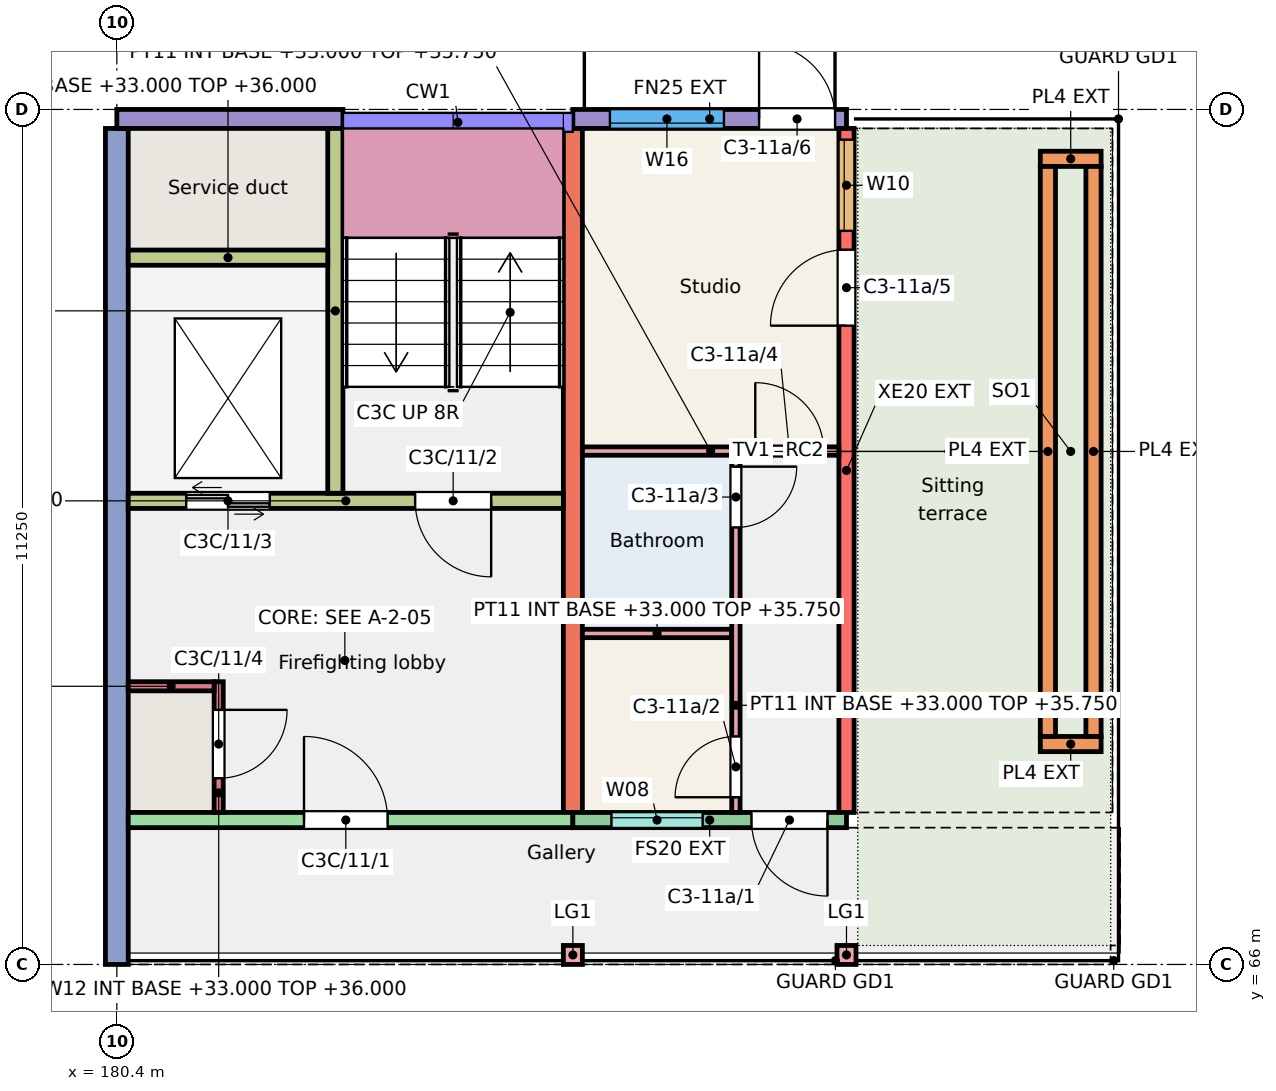
"""IFC4 building model, lengths in metres.
Left out: names, types, materials, properties, quantities, classifications, styles, units other than length and angle.
Written with IfcOpenShell. Run it as: python <this file> out.ifc"""

import sys

from ifc_helpers import new_model, si_unit, direction, frame, frame_2d, origin, origin_2d, place, context, subcontext, project, spatial, rectangle, extrude, element, fill, save


model = new_model("IFC4")
c1 = context("Model", 3, precision=1e-05, world=origin(), true_north=direction((0.0, 1.0)))
c2 = subcontext(c1, "Body", "Model", "MODEL_VIEW")
j1 = project(units=[si_unit("LENGTHUNIT", "METRE"), si_unit("PLANEANGLEUNIT", "RADIAN")], contexts=[c1])
p1 = place(None, origin())
s1 = spatial("IfcSite", under=j1, at=p1, CompositionType="ELEMENT")
p2 = place(p1, origin())
s2 = spatial("IfcBuilding", under=s1, at=p2, CompositionType="ELEMENT")
p3 = place(p2, frame((0.0, 0.0, 33.0)))
s3 = spatial("IfcBuildingStorey", under=s2, at=p3, CompositionType="ELEMENT", Elevation=33.0)
p4 = place(p3, frame((180.4, 66.0, 0.0), z_axis=(0.0, 0.0, 1.0), x_axis=(0.0, 1.0, 0.0)))
e1 = element("IfcWall", 1, at=p4, inside=s3, PredefinedType="SHEAR", context=c2, shape_type="SweptSolid", body=[
    extrude(rectangle(XDim=11.0, YDim=0.3, at=frame_2d((5.5, 0.0))), origin(), (0.0, 0.0, 1.0), 3.0),
])
p5 = place(p3, frame((186.4, 68.0, 0.0), z_axis=(0.0, 0.0, 1.0), x_axis=(0.0, 1.0, 0.0)))
e2 = element("IfcWall", 2, at=p5, inside=s3, PredefinedType="SHEAR", context=c2, shape_type="SweptSolid", body=[
    extrude(rectangle(XDim=9.0, YDim=0.25, at=frame_2d((4.5, 0.0))), origin(), (0.0, 0.0, 1.0), 3.0),
])
p6 = place(p3, frame((190.0, 68.0, 0.0), z_axis=(0.0, 0.0, 1.0), x_axis=(0.0, 1.0, 0.0)))
e3 = element("IfcWall", 3, at=p6, inside=s3, PredefinedType="SHEAR", context=c2, shape_type="SweptSolid", body=[
    extrude(rectangle(XDim=9.0, YDim=0.2, at=frame_2d((4.5, 0.0))), origin(), (0.0, 0.0, 1.0), 3.0),
])
p7 = place(p6, frame((7.653, 0.0, 0.9)))
e4 = element("IfcOpeningElement", 4, at=p7, cuts=e3, PredefinedType="OPENING", context=c2, shape_type="SweptSolid", body=[
    extrude(rectangle(XDim=1.2, YDim=1.5, at=frame_2d((0.6, 0.75))), frame((0.0, 0.11, 0.0), z_axis=(0.0, -1.0, 0.0), x_axis=(1.0, 0.0, 0.0)), (0.0, 0.0, 1.0), 0.22),
])
p8 = place(p6, frame((6.405, 0.0, 0.0)))
e5 = element("IfcOpeningElement", 5, at=p8, cuts=e3, PredefinedType="OPENING", context=c2, shape_type="SweptSolid", body=[
    extrude(rectangle(XDim=1.0, YDim=2.1, at=frame_2d((0.5, 1.05))), frame((0.0, 0.11, 0.0), z_axis=(0.0, -1.0, 0.0), x_axis=(1.0, 0.0, 0.0)), (0.0, 0.0, 1.0), 0.22),
])
p9 = place(p3, frame((180.4, 77.125, 0.0), z_axis=(0.0, 0.0, 1.0), x_axis=(1.0, 0.0, 0.0)))
e6 = element("IfcWall", 6, at=p9, inside=s3, PredefinedType="SOLIDWALL", context=c2, shape_type="SweptSolid", body=[
    extrude(rectangle(XDim=2.975, YDim=0.25, at=frame_2d((1.488, 0.0))), origin(), (0.0, 0.0, 1.0), 3.0),
])
p10 = place(p3, frame((180.55, 67.9, 0.0), z_axis=(0.0, 0.0, 1.0), x_axis=(1.0, 0.0, 0.0)))
e7 = element("IfcWall", 7, at=p10, inside=s3, PredefinedType="SHEAR", context=c2, shape_type="SweptSolid", body=[
    extrude(rectangle(XDim=5.85, YDim=0.2, at=frame_2d((2.925, 0.0))), origin(), (0.0, 0.0, 1.0), 3.0),
])
p11 = place(p10, frame((2.312, 0.0, 0.0)))
e8 = element("IfcOpeningElement", 8, at=p11, cuts=e7, PredefinedType="OPENING", context=c2, shape_type="SweptSolid", body=[
    extrude(rectangle(XDim=1.1, YDim=2.1, at=frame_2d((0.55, 1.05))), frame((0.0, 0.11, 0.0), z_axis=(0.0, -1.0, 0.0), x_axis=(1.0, 0.0, 0.0)), (0.0, 0.0, 1.0), 0.22),
])
p12 = place(p3, frame((180.55, 72.1, 0.0), z_axis=(0.0, 0.0, 1.0), x_axis=(1.0, 0.0, 0.0)))
e9 = element("IfcWall", 9, at=p12, inside=s3, PredefinedType="SHEAR", context=c2, shape_type="SweptSolid", body=[
    extrude(rectangle(XDim=5.725, YDim=0.2, at=frame_2d((2.862, 0.0))), origin(), (0.0, 0.0, 1.0), 3.0),
])
p13 = place(p12, frame((3.775, 0.0, 0.0)))
e10 = element("IfcOpeningElement", 10, at=p13, cuts=e9, PredefinedType="OPENING", context=c2, shape_type="SweptSolid", body=[
    extrude(rectangle(XDim=1.0, YDim=2.1, at=frame_2d((0.5, 1.05))), frame((0.0, 0.11, 0.0), z_axis=(0.0, -1.0, 0.0), x_axis=(1.0, 0.0, 0.0)), (0.0, 0.0, 1.0), 0.22),
])
p14 = place(p12, frame((0.762, 0.0, 0.0)))
e11 = element("IfcOpeningElement", 11, at=p14, cuts=e9, PredefinedType="OPENING", context=c2, shape_type="SweptSolid", body=[
    extrude(rectangle(XDim=1.1, YDim=2.1, at=frame_2d((0.55, 1.05))), frame((0.0, 0.11, 0.0), z_axis=(0.0, -1.0, 0.0), x_axis=(1.0, 0.0, 0.0)), (0.0, 0.0, 1.0), 0.22),
])
p15 = place(p3, frame((183.275, 72.2, 0.0), z_axis=(0.0, 0.0, 1.0), x_axis=(0.0, 1.0, 0.0)))
e12 = element("IfcWall", 12, at=p15, inside=s3, PredefinedType="SHEAR", context=c2, shape_type="SweptSolid", body=[
    extrude(rectangle(XDim=4.8, YDim=0.2, at=frame_2d((2.4, 0.0))), origin(), (0.0, 0.0, 1.0), 3.0),
])
p16 = place(p3, frame((180.55, 75.3, 0.0), z_axis=(0.0, 0.0, 1.0), x_axis=(1.0, 0.0, 0.0)))
e13 = element("IfcWall", 13, at=p16, inside=s3, PredefinedType="SHEAR", context=c2, shape_type="SweptSolid", body=[
    extrude(rectangle(XDim=2.625, YDim=0.2, at=frame_2d((1.312, 0.0))), origin(), (0.0, 0.0, 1.0), 3.0),
])
p17 = place(p3, frame((181.74, 68.0, 0.0), z_axis=(0.0, 0.0, 1.0), x_axis=(0.0, 1.0, 0.0)))
e14 = element("IfcWall", 14, at=p17, inside=s3, PredefinedType="SHEAR", context=c2, shape_type="SweptSolid", body=[
    extrude(rectangle(XDim=1.72, YDim=0.12, at=frame_2d((0.86, 0.0))), origin(), (0.0, 0.0, 1.0), 3.0),
])
p18 = place(p17, frame((0.45, 0.0, 0.0)))
e15 = element("IfcOpeningElement", 15, at=p18, cuts=e14, PredefinedType="OPENING", context=c2, shape_type="SweptSolid", body=[
    extrude(rectangle(XDim=0.9, YDim=2.1, at=frame_2d((0.45, 1.05))), frame((0.0, 0.07, 0.0), z_axis=(0.0, -1.0, 0.0), x_axis=(1.0, 0.0, 0.0)), (0.0, 0.0, 1.0), 0.14),
])
p19 = place(p3, frame((180.55, 69.66, 0.0), z_axis=(0.0, 0.0, 1.0), x_axis=(1.0, 0.0, 0.0)))
e16 = element("IfcWall", 16, at=p19, inside=s3, PredefinedType="SHEAR", context=c2, shape_type="SweptSolid", body=[
    extrude(rectangle(XDim=1.13, YDim=0.12, at=frame_2d((0.565, 0.0))), origin(), (0.0, 0.0, 1.0), 3.0),
])
p20 = place(p3, frame((186.4, 77.125, 0.0), z_axis=(0.0, 0.0, 1.0), x_axis=(1.0, 0.0, 0.0)))
e17 = element("IfcWall", 17, at=p20, inside=s3, PredefinedType="SOLIDWALL", context=c2, shape_type="SweptSolid", body=[
    extrude(rectangle(XDim=3.6, YDim=0.25, at=frame_2d((1.8, 0.0))), origin(), (0.0, 0.0, 1.0), 3.0),
])
p21 = place(p20, frame((0.488, 0.0, 0.9)))
e18 = element("IfcOpeningElement", 18, at=p21, cuts=e17, PredefinedType="OPENING", context=c2, shape_type="SweptSolid", body=[
    extrude(rectangle(XDim=1.5, YDim=1.5, at=frame_2d((0.75, 0.75))), frame((0.0, 0.135, 0.0), z_axis=(0.0, -1.0, 0.0), x_axis=(1.0, 0.0, 0.0)), (0.0, 0.0, 1.0), 0.27),
])
p22 = place(p20, frame((2.45, 0.0, 0.0)))
e19 = element("IfcOpeningElement", 19, at=p22, cuts=e17, PredefinedType="OPENING", context=c2, shape_type="SweptSolid", body=[
    extrude(rectangle(XDim=1.0, YDim=2.1, at=frame_2d((0.5, 1.05))), frame((0.0, 0.135, 0.0), z_axis=(0.0, -1.0, 0.0), x_axis=(1.0, 0.0, 0.0)), (0.0, 0.0, 1.0), 0.27),
])
p23 = place(p3, frame((186.4, 67.9, 0.0), z_axis=(0.0, 0.0, 1.0), x_axis=(1.0, 0.0, 0.0)))
e20 = element("IfcWall", 20, at=p23, inside=s3, PredefinedType="SOLIDWALL", context=c2, shape_type="SweptSolid", body=[
    extrude(rectangle(XDim=3.6, YDim=0.2, at=frame_2d((1.8, 0.0))), origin(), (0.0, 0.0, 1.0), 3.0),
])
p24 = place(p23, frame((0.508, 0.0, 1.1)))
e21 = element("IfcOpeningElement", 21, at=p24, cuts=e20, PredefinedType="OPENING", context=c2, shape_type="SweptSolid", body=[
    extrude(rectangle(XDim=1.2, YDim=1.3, at=frame_2d((0.6, 0.65))), frame((0.0, 0.11, 0.0), z_axis=(0.0, -1.0, 0.0), x_axis=(1.0, 0.0, 0.0)), (0.0, 0.0, 1.0), 0.22),
])
p25 = place(p23, frame((2.35, 0.0, 0.0)))
e22 = element("IfcOpeningElement", 22, at=p25, cuts=e20, PredefinedType="OPENING", context=c2, shape_type="SweptSolid", body=[
    extrude(rectangle(XDim=1.0, YDim=2.1, at=frame_2d((0.5, 1.05))), frame((0.0, 0.11, 0.0), z_axis=(0.0, -1.0, 0.0), x_axis=(1.0, 0.0, 0.0)), (0.0, 0.0, 1.0), 0.22),
])
for number, where, z_axis, x_axis in (
    (23, (186.4, 66.125, 0.0), (0.0, 0.0, 1.0), (1.0, 0.0, 0.0)),
    (24, (190.0, 66.125, 0.0), (0.0, 0.0, 1.0), (1.0, 0.0, 0.0)),
):
    element("IfcColumn", number, at=place(p3, frame(where, z_axis=z_axis, x_axis=x_axis)), inside=s3, PredefinedType="COLUMN", context=c2, shape_type="SweptSolid", body=[
        extrude(rectangle(XDim=0.25, YDim=0.25, at=origin_2d()), origin(), (0.0, 0.0, 1.0), 3.0),
    ])
for number, where, z_axis, x_axis in (
    (25, (192.55, 68.9, 0.01), (0.0, 0.0, 1.0), (1.0, 0.0, 0.0)),
    (26, (192.55, 76.6, 0.01), (0.0, 0.0, 1.0), (1.0, 0.0, 0.0)),
):
    element("IfcWall", number, at=place(p3, frame(where, z_axis=z_axis, x_axis=x_axis)), inside=s3, PredefinedType="SOLIDWALL", context=c2, shape_type="SweptSolid", body=[
        extrude(rectangle(XDim=0.8, YDim=0.2, at=frame_2d((0.4, 0.0))), origin(), (0.0, 0.0, 1.0), 0.45),
    ])
for number, where, z_axis, x_axis in (
    (27, (192.65, 69.0, 0.01), (0.0, 0.0, 1.0), (0.0, 1.0, 0.0)),
    (28, (193.25, 69.0, 0.01), (0.0, 0.0, 1.0), (0.0, 1.0, 0.0)),
):
    element("IfcWall", number, at=place(p3, frame(where, z_axis=z_axis, x_axis=x_axis)), inside=s3, PredefinedType="SOLIDWALL", context=c2, shape_type="SweptSolid", body=[
        extrude(rectangle(XDim=7.5, YDim=0.2, at=frame_2d((3.75, 0.0))), origin(), (0.0, 0.0, 1.0), 0.45),
    ])
p26 = place(p3, frame((186.525, 70.355, 0.0), z_axis=(0.0, 0.0, 1.0), x_axis=(1.0, 0.0, 0.0)))
e29 = element("IfcWall", 29, at=p26, inside=s3, PredefinedType="PARTITIONING", context=c2, shape_type="SweptSolid", body=[
    extrude(rectangle(XDim=1.965, YDim=0.11, at=frame_2d((0.982, 0.0))), origin(), (0.0, 0.0, 1.0), 2.75),
])
p27 = place(p3, frame((188.545, 68.0, 0.0), z_axis=(0.0, 0.0, 1.0), x_axis=(0.0, 1.0, 0.0)))
e30 = element("IfcWall", 30, at=p27, inside=s3, PredefinedType="PARTITIONING", context=c2, shape_type="SweptSolid", body=[
    extrude(rectangle(XDim=4.7, YDim=0.11, at=frame_2d((2.35, 0.0))), origin(), (0.0, 0.0, 1.0), 2.75),
])
p28 = place(p27, frame((0.2, 0.0, 0.0)))
e31 = element("IfcOpeningElement", 31, at=p28, cuts=e30, PredefinedType="OPENING", context=c2, shape_type="SweptSolid", body=[
    extrude(rectangle(XDim=0.8, YDim=2.1, at=frame_2d((0.4, 1.05))), frame((0.0, 0.065, 0.0), z_axis=(0.0, -1.0, 0.0), x_axis=(1.0, 0.0, 0.0)), (0.0, 0.0, 1.0), 0.13),
])
p29 = place(p27, frame((3.75, 0.0, 0.0)))
e32 = element("IfcOpeningElement", 32, at=p29, cuts=e30, PredefinedType="OPENING", context=c2, shape_type="SweptSolid", body=[
    extrude(rectangle(XDim=0.8, YDim=2.1, at=frame_2d((0.4, 1.05))), frame((0.0, 0.065, 0.0), z_axis=(0.0, -1.0, 0.0), x_axis=(1.0, 0.0, 0.0)), (0.0, 0.0, 1.0), 0.13),
])
p30 = place(p3, frame((186.525, 72.755, 0.0), z_axis=(0.0, 0.0, 1.0), x_axis=(1.0, 0.0, 0.0)))
e33 = element("IfcWall", 33, at=p30, inside=s3, PredefinedType="PARTITIONING", context=c2, shape_type="SweptSolid", body=[
    extrude(rectangle(XDim=3.375, YDim=0.11, at=frame_2d((1.688, 0.0))), origin(), (0.0, 0.0, 1.0), 2.75),
])
p31 = place(p30, frame((2.275, 0.0, 0.0)))
e34 = element("IfcOpeningElement", 34, at=p31, cuts=e33, PredefinedType="OPENING", context=c2, shape_type="SweptSolid", body=[
    extrude(rectangle(XDim=0.9, YDim=2.1, at=frame_2d((0.45, 1.05))), frame((0.0, 0.065, 0.0), z_axis=(0.0, -1.0, 0.0), x_axis=(1.0, 0.0, 0.0)), (0.0, 0.0, 1.0), 0.13),
])
p32 = place(p24, origin())
e35 = element("IfcWindow", 35, at=p32, inside=s3, PartitioningType="SINGLE_PANEL", PredefinedType="WINDOW", context=c2, shape_type="SweptSolid", body=[
    extrude(rectangle(XDim=1.2, YDim=1.3, at=frame_2d((0.6, 0.65))), frame((0.0, 0.06, 0.0), z_axis=(0.0, -1.0, 0.0), x_axis=(1.0, 0.0, 0.0)), (0.0, 0.0, 1.0), 0.06),
])
fill(e21, e35)
p33 = place(p21, origin())
e36 = element("IfcWindow", 36, at=p33, inside=s3, PartitioningType="SINGLE_PANEL", PredefinedType="WINDOW", context=c2, shape_type="SweptSolid", body=[
    extrude(rectangle(XDim=1.5, YDim=1.5, at=frame_2d((0.75, 0.75))), frame((0.0, -0.025, 0.0), z_axis=(0.0, -1.0, 0.0), x_axis=(1.0, 0.0, 0.0)), (0.0, 0.0, 1.0), 0.06),
])
fill(e18, e36)
p34 = place(p7, origin())
e37 = element("IfcWindow", 37, at=p34, inside=s3, PartitioningType="SINGLE_PANEL", PredefinedType="WINDOW", context=c2, shape_type="SweptSolid", body=[
    extrude(rectangle(XDim=1.2, YDim=1.5, at=frame_2d((0.6, 0.75))), frame((0.0, 0.06, 0.0), z_axis=(0.0, -1.0, 0.0), x_axis=(1.0, 0.0, 0.0)), (0.0, 0.0, 1.0), 0.06),
])
fill(e4, e37)
p35 = place(p25, origin())
e38 = element("IfcDoor", 38, at=p35, inside=s3, OperationType="SINGLE_SWING_RIGHT", PredefinedType="DOOR", context=c2, shape_type="SweptSolid", body=[
    extrude(rectangle(XDim=1.0, YDim=2.1, at=frame_2d((0.5, 1.05))), frame((0.0, 0.025, 0.0), z_axis=(0.0, -1.0, 0.0), x_axis=(1.0, 0.0, 0.0)), (0.0, 0.0, 1.0), 0.05),
])
fill(e22, e38)
p36 = place(p28, origin())
e39 = element("IfcDoor", 39, at=p36, inside=s3, OperationType="SINGLE_SWING_LEFT", PredefinedType="DOOR", context=c2, shape_type="SweptSolid", body=[
    extrude(rectangle(XDim=0.8, YDim=2.1, at=frame_2d((0.4, 1.05))), frame((0.0, 0.025, 0.0), z_axis=(0.0, -1.0, 0.0), x_axis=(1.0, 0.0, 0.0)), (0.0, 0.0, 1.0), 0.05),
])
fill(e31, e39)
p37 = place(p29, origin())
e40 = element("IfcDoor", 40, at=p37, inside=s3, OperationType="SINGLE_SWING_RIGHT", PredefinedType="DOOR", context=c2, shape_type="SweptSolid", body=[
    extrude(rectangle(XDim=0.8, YDim=2.1, at=frame_2d((0.4, 1.05))), frame((0.0, 0.025, 0.0), z_axis=(0.0, -1.0, 0.0), x_axis=(1.0, 0.0, 0.0)), (0.0, 0.0, 1.0), 0.05),
])
fill(e32, e40)
p38 = place(p31, origin())
e41 = element("IfcDoor", 41, at=p38, inside=s3, OperationType="SINGLE_SWING_LEFT", PredefinedType="DOOR", context=c2, shape_type="SweptSolid", body=[
    extrude(rectangle(XDim=0.9, YDim=2.1, at=frame_2d((0.45, 1.05))), frame((0.0, 0.025, 0.0), z_axis=(0.0, -1.0, 0.0), x_axis=(1.0, 0.0, 0.0)), (0.0, 0.0, 1.0), 0.05),
])
fill(e34, e41)
p39 = place(p8, origin())
e42 = element("IfcDoor", 42, at=p39, inside=s3, OperationType="SINGLE_SWING_LEFT", PredefinedType="DOOR", context=c2, shape_type="SweptSolid", body=[
    extrude(rectangle(XDim=1.0, YDim=2.1, at=frame_2d((0.5, 1.05))), frame((0.0, 0.025, 0.0), z_axis=(0.0, -1.0, 0.0), x_axis=(1.0, 0.0, 0.0)), (0.0, 0.0, 1.0), 0.05),
])
fill(e5, e42)
p40 = place(p22, origin())
e43 = element("IfcDoor", 43, at=p40, inside=s3, OperationType="SINGLE_SWING_LEFT", PredefinedType="DOOR", context=c2, shape_type="SweptSolid", body=[
    extrude(rectangle(XDim=1.0, YDim=2.1, at=frame_2d((0.5, 1.05))), frame((0.0, 0.025, 0.0), z_axis=(0.0, -1.0, 0.0), x_axis=(1.0, 0.0, 0.0)), (0.0, 0.0, 1.0), 0.05),
])
fill(e19, e43)
p41 = place(p11, origin())
e44 = element("IfcDoor", 44, at=p41, inside=s3, OperationType="SINGLE_SWING_LEFT", PredefinedType="DOOR", context=c2, shape_type="SweptSolid", body=[
    extrude(rectangle(XDim=1.1, YDim=2.1, at=frame_2d((0.55, 1.05))), frame((0.0, 0.025, 0.0), z_axis=(0.0, -1.0, 0.0), x_axis=(1.0, 0.0, 0.0)), (0.0, 0.0, 1.0), 0.05),
])
fill(e8, e44)
p42 = place(p13, origin())
e45 = element("IfcDoor", 45, at=p42, inside=s3, OperationType="SINGLE_SWING_RIGHT", PredefinedType="DOOR", context=c2, shape_type="SweptSolid", body=[
    extrude(rectangle(XDim=1.0, YDim=2.1, at=frame_2d((0.5, 1.05))), frame((0.0, 0.025, 0.0), z_axis=(0.0, -1.0, 0.0), x_axis=(1.0, 0.0, 0.0)), (0.0, 0.0, 1.0), 0.05),
])
fill(e10, e45)
p43 = place(p14, origin())
e46 = element("IfcDoor", 46, at=p43, inside=s3, OperationType="DOUBLE_DOOR_SLIDING", PredefinedType="DOOR", context=c2, shape_type="SweptSolid", body=[
    extrude(rectangle(XDim=1.1, YDim=2.1, at=frame_2d((0.55, 1.05))), frame((0.0, 0.025, 0.0), z_axis=(0.0, -1.0, 0.0), x_axis=(1.0, 0.0, 0.0)), (0.0, 0.0, 1.0), 0.05),
])
fill(e11, e46)
p44 = place(p18, origin())
e47 = element("IfcDoor", 47, at=p44, inside=s3, OperationType="SINGLE_SWING_RIGHT", PredefinedType="DOOR", context=c2, shape_type="SweptSolid", body=[
    extrude(rectangle(XDim=0.9, YDim=2.1, at=frame_2d((0.45, 1.05))), frame((0.0, 0.025, 0.0), z_axis=(0.0, -1.0, 0.0), x_axis=(1.0, 0.0, 0.0)), (0.0, 0.0, 1.0), 0.05),
])
fill(e15, e47)
save(model, sys.argv[1])
